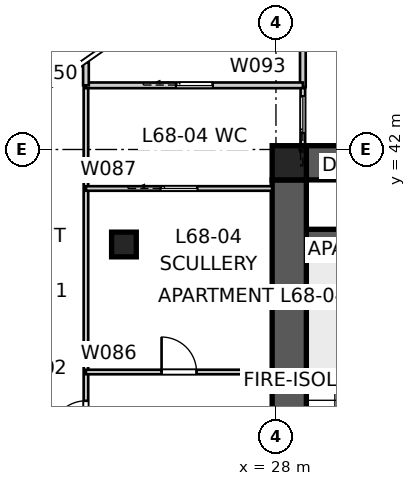
"""IFC4 building model, lengths in metres.
Left out: names, types, materials, properties, quantities, classifications, styles, units other than length and angle.
Written with IfcOpenShell. Run it as: python <this file> out.ifc"""

import sys

from ifc_helpers import new_model, si_unit, direction, frame, frame_2d, origin, origin_2d, place, context, subcontext, project, spatial, polyline, rectangle, outline, extrude, element, fill, save


model = new_model("IFC4")
c1 = context("Model", 3, precision=1e-05, world=origin(), true_north=direction((0.0, 1.0)))
c2 = subcontext(c1, "Body", "Model", "MODEL_VIEW")
j1 = project(units=[si_unit("LENGTHUNIT", "METRE"), si_unit("PLANEANGLEUNIT", "RADIAN")], contexts=[c1])
p1 = place(None, origin())
s1 = spatial("IfcSite", under=j1, at=p1, CompositionType="ELEMENT")
p2 = place(p1, origin())
s2 = spatial("IfcBuilding", under=s1, at=p2, CompositionType="ELEMENT")
p3 = place(p2, frame((0.0, 0.0, 247.2)))
s3 = spatial("IfcBuildingStorey", under=s2, at=p3, CompositionType="ELEMENT", Elevation=247.2)
p4 = place(p3, frame((28.8, 41.65, 0.0), z_axis=(0.0, 0.0, 1.0), x_axis=(1.0, 0.0, 0.0)))
e1 = element("IfcWall", 1, at=p4, inside=s3, PredefinedType="SHEAR", context=c2, shape_type="SweptSolid", body=[
    extrude(outline(polyline([(0.0, -0.45), (22.4, -0.45), (22.4, -0.025), (22.85, -0.025), (22.85, 0.025), (22.4, 0.025), (22.4, 0.45), (0.0, 0.45), (0.0, 0.025), (-0.45, 0.025), (-0.45, -0.025), (0.0, -0.025), (0.0, -0.45)])), origin(), (0.0, 0.0, 1.0), 3.4),
])
p5 = place(p3, frame((28.35, 41.2, 0.0), z_axis=(0.0, 0.0, 1.0), x_axis=(0.0, -1.0, 0.0)))
e2 = element("IfcWall", 2, at=p5, inside=s3, PredefinedType="SHEAR", context=c2, shape_type="SweptSolid", body=[
    extrude(outline(polyline([(0.0, -0.45), (22.4, -0.45), (22.4, -0.025), (22.85, -0.025), (22.85, 0.025), (22.4, 0.025), (22.4, 0.45), (0.0, 0.45), (0.0, 0.025), (-0.45, 0.025), (-0.45, -0.025), (0.0, -0.025), (0.0, -0.45)])), origin(), (0.0, 0.0, 1.0), 3.4),
])
p6 = place(p5, frame((11.14, 0.0, 0.0)))
e3 = element("IfcOpeningElement", 3, at=p6, cuts=e2, PredefinedType="OPENING", context=c2, shape_type="SweptSolid", body=[
    extrude(rectangle(XDim=1.02, YDim=2.4, at=frame_2d((0.51, 1.2))), frame((0.0, 0.46, 0.0), z_axis=(0.0, -1.0, 0.0), x_axis=(1.0, 0.0, 0.0)), (0.0, 0.0, 1.0), 0.92),
])
p7 = place(p3, frame((28.8, 39.75, 0.0), z_axis=(0.0, 0.0, 1.0), x_axis=(1.0, 0.0, 0.0)))
e4 = element("IfcWall", 4, at=p7, inside=s3, PredefinedType="SHEAR", context=c2, shape_type="SweptSolid", body=[
    extrude(rectangle(XDim=3.5, YDim=0.3, at=frame_2d((1.75, 0.0))), origin(), (0.0, 0.0, 1.0), 3.4),
])
p8 = place(p3, frame((28.35, 41.65, 0.0), z_axis=(0.0, 0.0, 1.0), x_axis=(1.0, 0.0, 0.0)))
e5 = element("IfcColumn", 5, at=p8, inside=s3, PredefinedType="COLUMN", context=c2, shape_type="SweptSolid", body=[
    extrude(rectangle(XDim=0.9, YDim=0.9, at=origin_2d()), origin(), (0.0, 0.0, 1.0), 3.4),
])
p9 = place(p3, frame((24.0, 39.5, 0.0), z_axis=(0.0, 0.0, 1.0), x_axis=(1.0, 0.0, 0.0)))
e6 = element("IfcColumn", 6, at=p9, inside=s3, PredefinedType="COLUMN", context=c2, shape_type="SweptSolid", body=[
    extrude(rectangle(XDim=0.65, YDim=0.65, at=origin_2d()), origin(), (0.0, 0.0, 1.0), 3.4),
])
p10 = place(p3, frame((23.0, 16.864, 0.0), z_axis=(0.0, 0.0, 1.0), x_axis=(0.0, 1.0, 0.0)))
e7 = element("IfcWall", 7, at=p10, inside=s3, PredefinedType="PARTITIONING", context=c2, shape_type="SweptSolid", body=[
    extrude(rectangle(XDim=26.824, YDim=0.12, at=frame_2d((13.412, 0.0))), origin(), (0.0, 0.0, 1.0), 2.55),
])
p11 = place(p10, frame((9.599, 0.0, 0.0)))
e8 = element("IfcOpeningElement", 8, at=p11, cuts=e7, PredefinedType="OPENING", context=c2, shape_type="SweptSolid", body=[
    extrude(rectangle(XDim=0.92, YDim=2.34, at=frame_2d((0.46, 1.17))), frame((0.0, 0.07, 0.0), z_axis=(0.0, -1.0, 0.0), x_axis=(1.0, 0.0, 0.0)), (0.0, 0.0, 1.0), 0.14),
])
p12 = place(p10, frame((17.603, 0.0, 0.0)))
e9 = element("IfcOpeningElement", 9, at=p12, cuts=e7, PredefinedType="OPENING", context=c2, shape_type="SweptSolid", body=[
    extrude(rectangle(XDim=0.92, YDim=2.34, at=frame_2d((0.46, 1.17))), frame((0.0, 0.07, 0.0), z_axis=(0.0, -1.0, 0.0), x_axis=(1.0, 0.0, 0.0)), (0.0, 0.0, 1.0), 0.14),
])
p13 = place(p10, frame((12.806, 0.0, 0.0)))
e10 = element("IfcOpeningElement", 10, at=p13, cuts=e7, PredefinedType="OPENING", context=c2, shape_type="SweptSolid", body=[
    extrude(rectangle(XDim=0.92, YDim=2.34, at=frame_2d((0.46, 1.17))), frame((0.0, 0.07, 0.0), z_axis=(0.0, -1.0, 0.0), x_axis=(1.0, 0.0, 0.0)), (0.0, 0.0, 1.0), 0.14),
])
p14 = place(p3, frame((23.0, 36.145, 0.0), z_axis=(0.0, 0.0, 1.0), x_axis=(1.0, 0.0, 0.0)))
e11 = element("IfcWall", 11, at=p14, inside=s3, PredefinedType="PARTITIONING", context=c2, shape_type="SweptSolid", body=[
    extrude(rectangle(XDim=4.9, YDim=0.12, at=frame_2d((2.45, 0.0))), origin(), (0.0, 0.0, 1.0), 3.25),
])
p15 = place(p14, frame((1.99, 0.0, 0.0)))
e12 = element("IfcOpeningElement", 12, at=p15, cuts=e11, PredefinedType="OPENING", context=c2, shape_type="SweptSolid", body=[
    extrude(rectangle(XDim=0.92, YDim=2.34, at=frame_2d((0.46, 1.17))), frame((0.0, 0.07, 0.0), z_axis=(0.0, -1.0, 0.0), x_axis=(1.0, 0.0, 0.0)), (0.0, 0.0, 1.0), 0.14),
])
p16 = place(p3, frame((23.0, 40.974, 0.0), z_axis=(0.0, 0.0, 1.0), x_axis=(1.0, 0.0, 0.0)))
e13 = element("IfcWall", 13, at=p16, inside=s3, PredefinedType="PARTITIONING", context=c2, shape_type="SweptSolid", body=[
    extrude(rectangle(XDim=4.9, YDim=0.12, at=frame_2d((2.45, 0.0))), origin(), (0.0, 0.0, 1.0), 3.25),
])
p17 = place(p16, frame((1.97, 0.0, 0.0)))
e14 = element("IfcOpeningElement", 14, at=p17, cuts=e13, PredefinedType="OPENING", context=c2, shape_type="SweptSolid", body=[
    extrude(rectangle(XDim=0.96, YDim=2.1, at=frame_2d((0.48, 1.05))), frame((0.0, 0.07, 0.0), z_axis=(0.0, -1.0, 0.0), x_axis=(1.0, 0.0, 0.0)), (0.0, 0.0, 1.0), 0.14),
])
p18 = place(p3, frame((28.708, 41.18, 0.0), z_axis=(0.0, 0.0, 1.0), x_axis=(0.0, 1.0, 0.0)))
e15 = element("IfcWall", 15, at=p18, inside=s3, PredefinedType="PARTITIONING", context=c2, shape_type="SweptSolid", body=[
    extrude(rectangle(XDim=2.458, YDim=0.12, at=frame_2d((1.229, 0.0))), origin(), (0.0, 0.0, 1.0), 3.25),
])
p19 = place(p18, frame((1.259, 0.0, 0.0)))
e16 = element("IfcOpeningElement", 16, at=p19, cuts=e15, PredefinedType="OPENING", context=c2, shape_type="SweptSolid", body=[
    extrude(rectangle(XDim=0.96, YDim=2.1, at=frame_2d((0.48, 1.05))), frame((0.0, 0.07, 0.0), z_axis=(0.0, -1.0, 0.0), x_axis=(1.0, 0.0, 0.0)), (0.0, 0.0, 1.0), 0.14),
])
p20 = place(p3, frame((28.708, 43.638, 0.0), z_axis=(0.0, 0.0, 1.0), x_axis=(0.0, 1.0, 0.0)))
e17 = element("IfcWall", 17, at=p20, inside=s3, PredefinedType="SOLIDWALL", context=c2, shape_type="SweptSolid", body=[
    extrude(rectangle(XDim=3.362, YDim=0.15, at=frame_2d((1.681, 0.0))), origin(), (0.0, 0.0, 1.0), 3.25),
])
p21 = place(p3, frame((23.0, 43.688, 0.0), z_axis=(0.0, 0.0, 1.0), x_axis=(1.0, 0.0, 0.0)))
e18 = element("IfcWall", 18, at=p21, inside=s3, PredefinedType="SOLIDWALL", context=c2, shape_type="SweptSolid", body=[
    extrude(rectangle(XDim=5.708, YDim=0.15, at=frame_2d((2.854, 0.0))), origin(), (0.0, 0.0, 1.0), 3.25),
])
p22 = place(p21, frame((2.374, 0.0, 0.0)))
e19 = element("IfcOpeningElement", 19, at=p22, cuts=e18, PredefinedType="OPENING", context=c2, shape_type="SweptSolid", body=[
    extrude(rectangle(XDim=0.96, YDim=2.1, at=frame_2d((0.48, 1.05))), frame((0.0, 0.085, 0.0), z_axis=(0.0, -1.0, 0.0), x_axis=(1.0, 0.0, 0.0)), (0.0, 0.0, 1.0), 0.17),
])
p23 = place(p3, frame((23.0, 43.688, 0.0), z_axis=(0.0, 0.0, 1.0), x_axis=(0.0, 1.0, 0.0)))
e20 = element("IfcWall", 20, at=p23, inside=s3, PredefinedType="SOLIDWALL", context=c2, shape_type="SweptSolid", body=[
    extrude(rectangle(XDim=0.606, YDim=0.15, at=frame_2d((0.303, 0.0))), origin(), (0.0, 0.0, 1.0), 3.25),
])
p24 = place(p3, frame((23.0, 31.396, 0.0), z_axis=(0.0, 0.0, 1.0), x_axis=(-0.573575545802, 0.819152667857, 0.0)))
e21 = element("IfcWall", 21, at=p24, inside=s3, PredefinedType="PARTITIONING", context=c2, shape_type="SweptSolid", body=[
    extrude(rectangle(XDim=10.566, YDim=0.12, at=frame_2d((5.283, 0.0))), origin(), (0.0, 0.0, 1.0), 3.25),
])
p25 = place(p24, frame((3.958, 0.0, 0.0)))
e22 = element("IfcOpeningElement", 22, at=p25, cuts=e21, PredefinedType="OPENING", context=c2, shape_type="SweptSolid", body=[
    extrude(rectangle(XDim=0.92, YDim=2.34, at=frame_2d((0.46, 1.17))), frame((0.0, 0.07, 0.0), z_axis=(0.0, -1.0, 0.0), x_axis=(1.0, 0.0, 0.0)), (0.0, 0.0, 1.0), 0.14),
])
p26 = place(p24, frame((8.121, 0.0, 0.0)))
e23 = element("IfcOpeningElement", 23, at=p26, cuts=e21, PredefinedType="OPENING", context=c2, shape_type="SweptSolid", body=[
    extrude(rectangle(XDim=0.92, YDim=2.34, at=frame_2d((0.46, 1.17))), frame((0.0, 0.07, 0.0), z_axis=(0.0, -1.0, 0.0), x_axis=(1.0, 0.0, 0.0)), (0.0, 0.0, 1.0), 0.14),
])
p27 = place(p15, origin())
e24 = element("IfcDoor", 24, at=p27, inside=s3, OperationType="SINGLE_SWING_LEFT", PredefinedType="DOOR", context=c2, shape_type="SweptSolid", body=[
    extrude(rectangle(XDim=0.92, YDim=2.34, at=frame_2d((0.46, 1.17))), frame((0.0, 0.025, 0.0), z_axis=(0.0, -1.0, 0.0), x_axis=(1.0, 0.0, 0.0)), (0.0, 0.0, 1.0), 0.05),
])
fill(e12, e24)
p28 = place(p12, origin())
e25 = element("IfcDoor", 25, at=p28, inside=s3, OperationType="SINGLE_SWING_LEFT", PredefinedType="DOOR", context=c2, shape_type="SweptSolid", body=[
    extrude(rectangle(XDim=0.92, YDim=2.34, at=frame_2d((0.46, 1.17))), frame((0.0, 0.025, 0.0), z_axis=(0.0, -1.0, 0.0), x_axis=(1.0, 0.0, 0.0)), (0.0, 0.0, 1.0), 0.05),
])
fill(e9, e25)
p29 = place(p17, origin())
e26 = element("IfcDoor", 26, at=p29, inside=s3, OperationType="SLIDING_TO_LEFT", PredefinedType="DOOR", context=c2, shape_type="SweptSolid", body=[
    extrude(rectangle(XDim=0.96, YDim=2.1, at=frame_2d((0.48, 1.05))), frame((0.0, 0.025, 0.0), z_axis=(0.0, -1.0, 0.0), x_axis=(1.0, 0.0, 0.0)), (0.0, 0.0, 1.0), 0.05),
])
fill(e14, e26)
p30 = place(p22, origin())
e27 = element("IfcDoor", 27, at=p30, inside=s3, OperationType="SLIDING_TO_LEFT", PredefinedType="DOOR", context=c2, shape_type="SweptSolid", body=[
    extrude(rectangle(XDim=0.96, YDim=2.1, at=frame_2d((0.48, 1.05))), frame((0.0, 0.025, 0.0), z_axis=(0.0, -1.0, 0.0), x_axis=(1.0, 0.0, 0.0)), (0.0, 0.0, 1.0), 0.05),
])
fill(e19, e27)
p31 = place(p19, origin())
e28 = element("IfcDoor", 28, at=p31, inside=s3, OperationType="SLIDING_TO_LEFT", PredefinedType="DOOR", context=c2, shape_type="SweptSolid", body=[
    extrude(rectangle(XDim=0.96, YDim=2.1, at=frame_2d((0.48, 1.05))), frame((0.0, 0.025, 0.0), z_axis=(0.0, -1.0, 0.0), x_axis=(1.0, 0.0, 0.0)), (0.0, 0.0, 1.0), 0.05),
])
fill(e16, e28)
save(model, sys.argv[1])
